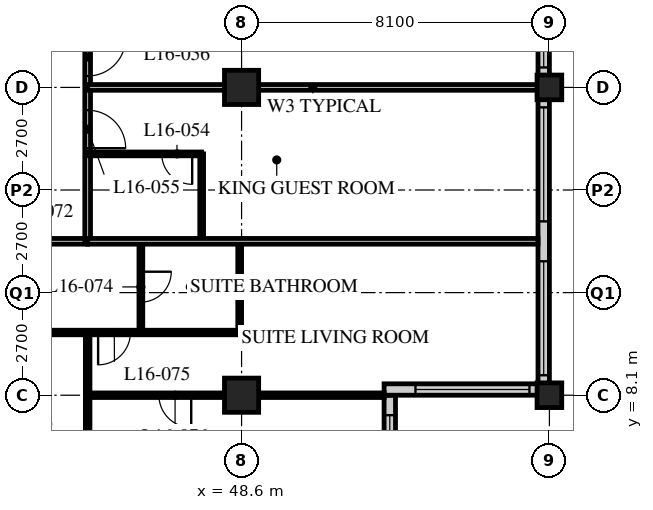
"""IFC4 building model, lengths in metres.
Left out: names, types, materials, properties, quantities, classifications, styles, units other than length and angle.
Written with IfcOpenShell. Run it as: python <this file> out.ifc"""

import sys

from ifc_helpers import new_model, si_unit, direction, frame, frame_2d, origin, origin_2d, place, context, subcontext, project, spatial, rectangle, hollow_rectangle, extrude, element, fill, save


model = new_model("IFC4")
c1 = context("Model", 3, precision=1e-05, world=origin(), true_north=direction((0.0, 1.0)))
c2 = subcontext(c1, "Body", "Model", "MODEL_VIEW")
j1 = project(units=[si_unit("LENGTHUNIT", "METRE"), si_unit("PLANEANGLEUNIT", "RADIAN")], contexts=[c1])
p1 = place(None, origin())
s1 = spatial("IfcSite", under=j1, at=p1, CompositionType="ELEMENT")
p2 = place(p1, origin())
s2 = spatial("IfcBuilding", under=s1, at=p2, CompositionType="ELEMENT")
p3 = place(p2, frame((0.0, 0.0, 67.0)))
s3 = spatial("IfcBuildingStorey", under=s2, at=p3, CompositionType="ELEMENT", Elevation=67.0)
for number, where, z_axis, x_axis in (
    (1, (48.6, 8.1, 0.0), (0.0, 0.0, 1.0), (1.0, 0.0, 0.0)),
    (2, (48.6, 16.2, 0.0), (0.0, 0.0, 1.0), (1.0, 0.0, 0.0)),
):
    element("IfcColumn", number, at=place(p3, frame(where, z_axis=z_axis, x_axis=x_axis)), inside=s3, PredefinedType="COLUMN", context=c2, shape_type="SweptSolid", body=[
        extrude(hollow_rectangle(XDim=0.9, YDim=0.9, WallThickness=0.09, at=origin_2d()), origin(), (0.0, 0.0, 1.0), 3.4),
    ])
for number, where, z_axis, x_axis in (
    (3, (56.7, 8.1, 0.0), (0.0, 0.0, 1.0), (1.0, 0.0, 0.0)),
    (4, (56.7, 16.2, 0.0), (0.0, 0.0, 1.0), (1.0, 0.0, 0.0)),
):
    element("IfcColumn", number, at=place(p3, frame(where, z_axis=z_axis, x_axis=x_axis)), inside=s3, PredefinedType="COLUMN", context=c2, shape_type="SweptSolid", body=[
        extrude(hollow_rectangle(XDim=0.65, YDim=0.65, WallThickness=0.05, at=origin_2d()), origin(), (0.0, 0.0, 1.0), 3.4),
    ])
p4 = place(p3, frame((52.5, 4.35, 0.0), z_axis=(0.0, 0.0, 1.0), x_axis=(0.0, 1.0, 0.0)))
e5 = element("IfcWall", 5, at=p4, inside=s3, PredefinedType="SOLIDWALL", context=c2, shape_type="SweptSolid", body=[
    extrude(rectangle(XDim=3.75, YDim=0.3, at=frame_2d((1.875, 0.0))), origin(), (0.0, 0.0, 1.0), 3.19),
])
p5 = place(p4, frame((0.225, 0.0, 0.9)))
e6 = element("IfcOpeningElement", 6, at=p5, cuts=e5, PredefinedType="OPENING", context=c2, shape_type="SweptSolid", body=[
    extrude(rectangle(XDim=3.0, YDim=1.5, at=frame_2d((1.5, 0.75))), frame((0.0, 0.16, 0.0), z_axis=(0.0, -1.0, 0.0), x_axis=(1.0, 0.0, 0.0)), (0.0, 0.0, 1.0), 0.32),
])
p6 = place(p3, frame((52.35, 8.25, 0.0), z_axis=(0.0, 0.0, 1.0), x_axis=(1.0, 0.0, 0.0)))
e7 = element("IfcWall", 7, at=p6, inside=s3, PredefinedType="SOLIDWALL", context=c2, shape_type="SweptSolid", body=[
    extrude(rectangle(XDim=4.35, YDim=0.3, at=frame_2d((2.175, 0.0))), origin(), (0.0, 0.0, 1.0), 3.19),
])
p7 = place(p6, frame((0.825, 0.0, 0.9)))
e8 = element("IfcOpeningElement", 8, at=p7, cuts=e7, PredefinedType="OPENING", context=c2, shape_type="SweptSolid", body=[
    extrude(rectangle(XDim=3.0, YDim=1.5, at=frame_2d((1.5, 0.75))), frame((0.0, 0.16, 0.0), z_axis=(0.0, -1.0, 0.0), x_axis=(1.0, 0.0, 0.0)), (0.0, 0.0, 1.0), 0.32),
])
p8 = place(p3, frame((56.55, 8.4, 0.0), z_axis=(0.0, 0.0, 1.0), x_axis=(0.0, 1.0, 0.0)))
e9 = element("IfcWall", 9, at=p8, inside=s3, PredefinedType="SOLIDWALL", context=c2, shape_type="SweptSolid", body=[
    extrude(rectangle(XDim=32.1, YDim=0.3, at=frame_2d((16.05, 0.0))), origin(), (0.0, 0.0, 1.0), 3.19),
])
p9 = place(p8, frame((0.225, 0.0, 0.9)))
e10 = element("IfcOpeningElement", 10, at=p9, cuts=e9, PredefinedType="OPENING", context=c2, shape_type="SweptSolid", body=[
    extrude(rectangle(XDim=3.0, YDim=2.0, at=frame_2d((1.5, 1.0))), frame((0.0, 0.16, 0.0), z_axis=(0.0, -1.0, 0.0), x_axis=(1.0, 0.0, 0.0)), (0.0, 0.0, 1.0), 0.32),
])
p10 = place(p8, frame((4.275, 0.0, 0.9)))
e11 = element("IfcOpeningElement", 11, at=p10, cuts=e9, PredefinedType="OPENING", context=c2, shape_type="SweptSolid", body=[
    extrude(rectangle(XDim=3.0, YDim=2.0, at=frame_2d((1.5, 1.0))), frame((0.0, 0.16, 0.0), z_axis=(0.0, -1.0, 0.0), x_axis=(1.0, 0.0, 0.0)), (0.0, 0.0, 1.0), 0.32),
])
p11 = place(p8, frame((8.325, 0.0, 0.9)))
e12 = element("IfcOpeningElement", 12, at=p11, cuts=e9, PredefinedType="OPENING", context=c2, shape_type="SweptSolid", body=[
    extrude(rectangle(XDim=3.0, YDim=2.0, at=frame_2d((1.5, 1.0))), frame((0.0, 0.16, 0.0), z_axis=(0.0, -1.0, 0.0), x_axis=(1.0, 0.0, 0.0)), (0.0, 0.0, 1.0), 0.32),
])
p12 = place(p8, frame((12.375, 0.0, 0.9)))
e13 = element("IfcOpeningElement", 13, at=p12, cuts=e9, PredefinedType="OPENING", context=c2, shape_type="SweptSolid", body=[
    extrude(rectangle(XDim=3.0, YDim=2.0, at=frame_2d((1.5, 1.0))), frame((0.0, 0.16, 0.0), z_axis=(0.0, -1.0, 0.0), x_axis=(1.0, 0.0, 0.0)), (0.0, 0.0, 1.0), 0.32),
])
p13 = place(p8, frame((16.425, 0.0, 0.9)))
e14 = element("IfcOpeningElement", 14, at=p13, cuts=e9, PredefinedType="OPENING", context=c2, shape_type="SweptSolid", body=[
    extrude(rectangle(XDim=3.0, YDim=2.0, at=frame_2d((1.5, 1.0))), frame((0.0, 0.16, 0.0), z_axis=(0.0, -1.0, 0.0), x_axis=(1.0, 0.0, 0.0)), (0.0, 0.0, 1.0), 0.32),
])
p14 = place(p8, frame((20.475, 0.0, 0.9)))
e15 = element("IfcOpeningElement", 15, at=p14, cuts=e9, PredefinedType="OPENING", context=c2, shape_type="SweptSolid", body=[
    extrude(rectangle(XDim=3.0, YDim=2.0, at=frame_2d((1.5, 1.0))), frame((0.0, 0.16, 0.0), z_axis=(0.0, -1.0, 0.0), x_axis=(1.0, 0.0, 0.0)), (0.0, 0.0, 1.0), 0.32),
])
p15 = place(p8, frame((24.525, 0.0, 0.9)))
e16 = element("IfcOpeningElement", 16, at=p15, cuts=e9, PredefinedType="OPENING", context=c2, shape_type="SweptSolid", body=[
    extrude(rectangle(XDim=3.0, YDim=2.0, at=frame_2d((1.5, 1.0))), frame((0.0, 0.16, 0.0), z_axis=(0.0, -1.0, 0.0), x_axis=(1.0, 0.0, 0.0)), (0.0, 0.0, 1.0), 0.32),
])
p16 = place(p8, frame((28.575, 0.0, 0.9)))
e17 = element("IfcOpeningElement", 17, at=p16, cuts=e9, PredefinedType="OPENING", context=c2, shape_type="SweptSolid", body=[
    extrude(rectangle(XDim=3.0, YDim=2.0, at=frame_2d((1.5, 1.0))), frame((0.0, 0.16, 0.0), z_axis=(0.0, -1.0, 0.0), x_axis=(1.0, 0.0, 0.0)), (0.0, 0.0, 1.0), 0.32),
])
p17 = place(p3, frame((8.1, 12.15, 0.0), z_axis=(0.0, 0.0, 1.0), x_axis=(1.0, 0.0, 0.0)))
e18 = element("IfcWall", 18, at=p17, inside=s3, PredefinedType="PARTITIONING", context=c2, shape_type="SweptSolid", body=[
    extrude(rectangle(XDim=36.45, YDim=0.15, at=frame_2d((18.225, 0.0))), origin(), (0.0, 0.0, 1.0), 3.19),
])
p18 = place(p17, frame((4.35, 0.0, 0.0)))
e19 = element("IfcOpeningElement", 19, at=p18, cuts=e18, PredefinedType="OPENING", context=c2, shape_type="SweptSolid", body=[
    extrude(rectangle(XDim=1.0, YDim=2.1, at=frame_2d((0.5, 1.05))), frame((0.0, 0.085, 0.0), z_axis=(0.0, -1.0, 0.0), x_axis=(1.0, 0.0, 0.0)), (0.0, 0.0, 1.0), 0.17),
])
p19 = place(p17, frame((10.55, 0.0, 0.0)))
e20 = element("IfcOpeningElement", 20, at=p19, cuts=e18, PredefinedType="OPENING", context=c2, shape_type="SweptSolid", body=[
    extrude(rectangle(XDim=1.0, YDim=2.1, at=frame_2d((0.5, 1.05))), frame((0.0, 0.085, 0.0), z_axis=(0.0, -1.0, 0.0), x_axis=(1.0, 0.0, 0.0)), (0.0, 0.0, 1.0), 0.17),
])
p20 = place(p17, frame((14.6, 0.0, 0.0)))
e21 = element("IfcOpeningElement", 21, at=p20, cuts=e18, PredefinedType="OPENING", context=c2, shape_type="SweptSolid", body=[
    extrude(rectangle(XDim=1.0, YDim=2.1, at=frame_2d((0.5, 1.05))), frame((0.0, 0.085, 0.0), z_axis=(0.0, -1.0, 0.0), x_axis=(1.0, 0.0, 0.0)), (0.0, 0.0, 1.0), 0.17),
])
p21 = place(p17, frame((18.65, 0.0, 0.0)))
e22 = element("IfcOpeningElement", 22, at=p21, cuts=e18, PredefinedType="OPENING", context=c2, shape_type="SweptSolid", body=[
    extrude(rectangle(XDim=1.0, YDim=2.1, at=frame_2d((0.5, 1.05))), frame((0.0, 0.085, 0.0), z_axis=(0.0, -1.0, 0.0), x_axis=(1.0, 0.0, 0.0)), (0.0, 0.0, 1.0), 0.17),
])
p22 = place(p17, frame((22.7, 0.0, 0.0)))
e23 = element("IfcOpeningElement", 23, at=p22, cuts=e18, PredefinedType="OPENING", context=c2, shape_type="SweptSolid", body=[
    extrude(rectangle(XDim=1.0, YDim=2.1, at=frame_2d((0.5, 1.05))), frame((0.0, 0.085, 0.0), z_axis=(0.0, -1.0, 0.0), x_axis=(1.0, 0.0, 0.0)), (0.0, 0.0, 1.0), 0.17),
])
p23 = place(p17, frame((24.6, 0.0, 0.0)))
e24 = element("IfcOpeningElement", 24, at=p23, cuts=e18, PredefinedType="OPENING", context=c2, shape_type="SweptSolid", body=[
    extrude(rectangle(XDim=1.0, YDim=2.1, at=frame_2d((0.5, 1.05))), frame((0.0, 0.085, 0.0), z_axis=(0.0, -1.0, 0.0), x_axis=(1.0, 0.0, 0.0)), (0.0, 0.0, 1.0), 0.17),
])
p24 = place(p17, frame((30.8, 0.0, 0.0)))
e25 = element("IfcOpeningElement", 25, at=p24, cuts=e18, PredefinedType="OPENING", context=c2, shape_type="SweptSolid", body=[
    extrude(rectangle(XDim=1.0, YDim=2.1, at=frame_2d((0.5, 1.05))), frame((0.0, 0.085, 0.0), z_axis=(0.0, -1.0, 0.0), x_axis=(1.0, 0.0, 0.0)), (0.0, 0.0, 1.0), 0.17),
])
p25 = place(p17, frame((1.525, 0.0, 0.0)))
e26 = element("IfcOpeningElement", 26, at=p25, cuts=e18, PredefinedType="OPENING", context=c2, shape_type="SweptSolid", body=[
    extrude(rectangle(XDim=1.0, YDim=2.1, at=frame_2d((0.5, 1.05))), frame((0.0, 0.085, 0.0), z_axis=(0.0, -1.0, 0.0), x_axis=(1.0, 0.0, 0.0)), (0.0, 0.0, 1.0), 0.17),
])
p26 = place(p17, frame((33.925, 0.0, 0.0)))
e27 = element("IfcOpeningElement", 27, at=p26, cuts=e18, PredefinedType="OPENING", context=c2, shape_type="SweptSolid", body=[
    extrude(rectangle(XDim=1.0, YDim=2.1, at=frame_2d((0.5, 1.05))), frame((0.0, 0.085, 0.0), z_axis=(0.0, -1.0, 0.0), x_axis=(1.0, 0.0, 0.0)), (0.0, 0.0, 1.0), 0.17),
])
p27 = place(p3, frame((44.55, 12.15, 0.0), z_axis=(0.0, 0.0, 1.0), x_axis=(0.0, 1.0, 0.0)))
e28 = element("IfcWall", 28, at=p27, inside=s3, PredefinedType="PARTITIONING", context=c2, shape_type="SweptSolid", body=[
    extrude(rectangle(XDim=30.15, YDim=0.15, at=frame_2d((15.075, 0.0))), origin(), (0.0, 0.0, 1.0), 3.19),
])
p28 = place(p27, frame((2.45, 0.0, 0.0)))
e29 = element("IfcOpeningElement", 29, at=p28, cuts=e28, PredefinedType="OPENING", context=c2, shape_type="SweptSolid", body=[
    extrude(rectangle(XDim=1.0, YDim=2.1, at=frame_2d((0.5, 1.05))), frame((0.0, 0.085, 0.0), z_axis=(0.0, -1.0, 0.0), x_axis=(1.0, 0.0, 0.0)), (0.0, 0.0, 1.0), 0.17),
])
p29 = place(p27, frame((4.35, 0.0, 0.0)))
e30 = element("IfcOpeningElement", 30, at=p29, cuts=e28, PredefinedType="OPENING", context=c2, shape_type="SweptSolid", body=[
    extrude(rectangle(XDim=1.0, YDim=2.1, at=frame_2d((0.5, 1.05))), frame((0.0, 0.085, 0.0), z_axis=(0.0, -1.0, 0.0), x_axis=(1.0, 0.0, 0.0)), (0.0, 0.0, 1.0), 0.17),
])
p30 = place(p27, frame((8.4, 0.0, 0.0)))
e31 = element("IfcOpeningElement", 31, at=p30, cuts=e28, PredefinedType="OPENING", context=c2, shape_type="SweptSolid", body=[
    extrude(rectangle(XDim=1.0, YDim=2.1, at=frame_2d((0.5, 1.05))), frame((0.0, 0.085, 0.0), z_axis=(0.0, -1.0, 0.0), x_axis=(1.0, 0.0, 0.0)), (0.0, 0.0, 1.0), 0.17),
])
p31 = place(p27, frame((14.6, 0.0, 0.0)))
e32 = element("IfcOpeningElement", 32, at=p31, cuts=e28, PredefinedType="OPENING", context=c2, shape_type="SweptSolid", body=[
    extrude(rectangle(XDim=1.0, YDim=2.1, at=frame_2d((0.5, 1.05))), frame((0.0, 0.085, 0.0), z_axis=(0.0, -1.0, 0.0), x_axis=(1.0, 0.0, 0.0)), (0.0, 0.0, 1.0), 0.17),
])
p32 = place(p27, frame((21.65, 0.0, 0.0)))
e33 = element("IfcOpeningElement", 33, at=p32, cuts=e28, PredefinedType="OPENING", context=c2, shape_type="SweptSolid", body=[
    extrude(rectangle(XDim=1.0, YDim=2.1, at=frame_2d((0.5, 1.05))), frame((0.0, 0.085, 0.0), z_axis=(0.0, -1.0, 0.0), x_axis=(1.0, 0.0, 0.0)), (0.0, 0.0, 1.0), 0.17),
])
p33 = place(p27, frame((26.7, 0.0, 0.0)))
e34 = element("IfcOpeningElement", 34, at=p33, cuts=e28, PredefinedType="OPENING", context=c2, shape_type="SweptSolid", body=[
    extrude(rectangle(XDim=1.0, YDim=2.1, at=frame_2d((0.5, 1.05))), frame((0.0, 0.085, 0.0), z_axis=(0.0, -1.0, 0.0), x_axis=(1.0, 0.0, 0.0)), (0.0, 0.0, 1.0), 0.17),
])
p34 = place(p3, frame((47.55, 12.15, 0.0), z_axis=(0.0, 0.0, 1.0), x_axis=(0.0, 1.0, 0.0)))
e35 = element("IfcWall", 35, at=p34, inside=s3, PredefinedType="PARTITIONING", context=c2, shape_type="SweptSolid", body=[
    extrude(rectangle(XDim=2.3, YDim=0.1, at=frame_2d((1.15, 0.0))), origin(), (0.0, 0.0, 1.0), 3.19),
])
p35 = place(p3, frame((44.55, 14.45, 0.0), z_axis=(0.0, 0.0, 1.0), x_axis=(1.0, 0.0, 0.0)))
e36 = element("IfcWall", 36, at=p35, inside=s3, PredefinedType="PARTITIONING", context=c2, shape_type="SweptSolid", body=[
    extrude(rectangle(XDim=3.0, YDim=0.1, at=frame_2d((1.5, 0.0))), origin(), (0.0, 0.0, 1.0), 3.19),
])
p36 = place(p35, frame((1.95, 0.0, 0.0)))
e37 = element("IfcOpeningElement", 37, at=p36, cuts=e36, PredefinedType="OPENING", context=c2, shape_type="SweptSolid", body=[
    extrude(rectangle(XDim=0.8, YDim=2.1, at=frame_2d((0.4, 1.05))), frame((0.0, 0.06, 0.0), z_axis=(0.0, -1.0, 0.0), x_axis=(1.0, 0.0, 0.0)), (0.0, 0.0, 1.0), 0.12),
])
p37 = place(p3, frame((44.55, 16.2, 0.0), z_axis=(0.0, 0.0, 1.0), x_axis=(1.0, 0.0, 0.0)))
e38 = element("IfcWall", 38, at=p37, inside=s3, PredefinedType="PARTITIONING", context=c2, shape_type="SweptSolid", body=[
    extrude(rectangle(XDim=11.85, YDim=0.15, at=frame_2d((5.925, 0.0))), origin(), (0.0, 0.0, 1.0), 2.578),
])
p38 = place(p3, frame((40.5, 9.75, 0.0), z_axis=(0.0, 0.0, 1.0), x_axis=(1.0, 0.0, 0.0)))
e39 = element("IfcWall", 39, at=p38, inside=s3, PredefinedType="PARTITIONING", context=c2, shape_type="SweptSolid", body=[
    extrude(rectangle(XDim=8.05, YDim=0.12, at=frame_2d((4.025, 0.0))), origin(), (0.0, 0.0, 1.0), 3.19),
])
p39 = place(p38, frame((0.475, 0.0, 0.0)))
e40 = element("IfcOpeningElement", 40, at=p39, cuts=e39, PredefinedType="OPENING", context=c2, shape_type="SweptSolid", body=[
    extrude(rectangle(XDim=0.85, YDim=2.1, at=frame_2d((0.425, 1.05))), frame((0.0, 0.07, 0.0), z_axis=(0.0, -1.0, 0.0), x_axis=(1.0, 0.0, 0.0)), (0.0, 0.0, 1.0), 0.14),
])
p40 = place(p38, frame((4.325, 0.0, 0.0)))
e41 = element("IfcOpeningElement", 41, at=p40, cuts=e39, PredefinedType="OPENING", context=c2, shape_type="SweptSolid", body=[
    extrude(rectangle(XDim=0.85, YDim=2.1, at=frame_2d((0.425, 1.05))), frame((0.0, 0.07, 0.0), z_axis=(0.0, -1.0, 0.0), x_axis=(1.0, 0.0, 0.0)), (0.0, 0.0, 1.0), 0.14),
])
p41 = place(p3, frame((45.95, 12.15, 0.0), z_axis=(0.0, 0.0, 1.0), x_axis=(0.0, -1.0, 0.0)))
e42 = element("IfcWall", 42, at=p41, inside=s3, PredefinedType="PARTITIONING", context=c2, shape_type="SweptSolid", body=[
    extrude(rectangle(XDim=2.4, YDim=0.1, at=frame_2d((1.2, 0.0))), origin(), (0.0, 0.0, 1.0), 3.19),
])
p42 = place(p41, frame((0.8, 0.0, 0.0)))
e43 = element("IfcOpeningElement", 43, at=p42, cuts=e42, PredefinedType="OPENING", context=c2, shape_type="SweptSolid", body=[
    extrude(rectangle(XDim=0.8, YDim=2.1, at=frame_2d((0.4, 1.05))), frame((0.0, 0.06, 0.0), z_axis=(0.0, -1.0, 0.0), x_axis=(1.0, 0.0, 0.0)), (0.0, 0.0, 1.0), 0.12),
])
p43 = place(p3, frame((48.55, 12.15, 0.0), z_axis=(0.0, 0.0, 1.0), x_axis=(0.0, -1.0, 0.0)))
e44 = element("IfcWall", 44, at=p43, inside=s3, PredefinedType="PARTITIONING", context=c2, shape_type="SweptSolid", body=[
    extrude(rectangle(XDim=2.4, YDim=0.1, at=frame_2d((1.2, 0.0))), origin(), (0.0, 0.0, 1.0), 2.578),
])
p44 = place(p3, frame((44.55, 9.75, 0.0), z_axis=(0.0, 0.0, 1.0), x_axis=(0.0, -1.0, 0.0)))
e45 = element("IfcWall", 45, at=p44, inside=s3, PredefinedType="PARTITIONING", context=c2, shape_type="SweptSolid", body=[
    extrude(rectangle(XDim=9.45, YDim=0.12, at=frame_2d((4.725, 0.0))), origin(), (0.0, 0.0, 1.0), 3.19),
])
p45 = place(p3, frame((44.55, 8.1, 0.0), z_axis=(0.0, 0.0, 1.0), x_axis=(1.0, 0.0, 0.0)))
e46 = element("IfcWall", 46, at=p45, inside=s3, PredefinedType="PARTITIONING", context=c2, shape_type="SweptSolid", body=[
    extrude(rectangle(XDim=7.8, YDim=0.12, at=frame_2d((3.9, 0.0))), origin(), (0.0, 0.0, 1.0), 2.578),
])
p46 = place(p45, frame((1.875, 0.0, 0.0)))
e47 = element("IfcOpeningElement", 47, at=p46, cuts=e46, PredefinedType="OPENING", context=c2, shape_type="SweptSolid", body=[
    extrude(rectangle(XDim=0.85, YDim=2.1, at=frame_2d((0.425, 1.05))), frame((0.0, 0.07, 0.0), z_axis=(0.0, -1.0, 0.0), x_axis=(1.0, 0.0, 0.0)), (0.0, 0.0, 1.0), 0.14),
])
p47 = place(p3, frame((44.55, 12.15, 0.0), z_axis=(0.0, 0.0, 1.0), x_axis=(1.0, 0.0, 0.0)))
e48 = element("IfcWall", 48, at=p47, inside=s3, PredefinedType="PARTITIONING", context=c2, shape_type="SweptSolid", body=[
    extrude(rectangle(XDim=11.85, YDim=0.15, at=frame_2d((5.925, 0.0))), origin(), (0.0, 0.0, 1.0), 3.19),
])
p48 = place(p5, origin())
e49 = element("IfcWindow", 49, at=p48, inside=s3, PartitioningType="SINGLE_PANEL", PredefinedType="WINDOW", context=c2, shape_type="SweptSolid", body=[
    extrude(rectangle(XDim=3.0, YDim=1.5, at=frame_2d((1.5, 0.75))), frame((0.0, 0.03, 0.0), z_axis=(0.0, -1.0, 0.0), x_axis=(1.0, 0.0, 0.0)), (0.0, 0.0, 1.0), 0.06),
])
fill(e6, e49)
p49 = place(p7, origin())
e50 = element("IfcWindow", 50, at=p49, inside=s3, PartitioningType="SINGLE_PANEL", PredefinedType="WINDOW", context=c2, shape_type="SweptSolid", body=[
    extrude(rectangle(XDim=3.0, YDim=1.5, at=frame_2d((1.5, 0.75))), frame((0.0, 0.03, 0.0), z_axis=(0.0, -1.0, 0.0), x_axis=(1.0, 0.0, 0.0)), (0.0, 0.0, 1.0), 0.06),
])
fill(e8, e50)
p50 = place(p9, origin())
e51 = element("IfcWindow", 51, at=p50, inside=s3, PartitioningType="SINGLE_PANEL", PredefinedType="WINDOW", context=c2, shape_type="SweptSolid", body=[
    extrude(rectangle(XDim=3.0, YDim=2.0, at=frame_2d((1.5, 1.0))), frame((0.0, 0.03, 0.0), z_axis=(0.0, -1.0, 0.0), x_axis=(1.0, 0.0, 0.0)), (0.0, 0.0, 1.0), 0.06),
])
fill(e10, e51)
p51 = place(p10, origin())
e52 = element("IfcWindow", 52, at=p51, inside=s3, PartitioningType="SINGLE_PANEL", PredefinedType="WINDOW", context=c2, shape_type="SweptSolid", body=[
    extrude(rectangle(XDim=3.0, YDim=2.0, at=frame_2d((1.5, 1.0))), frame((0.0, 0.03, 0.0), z_axis=(0.0, -1.0, 0.0), x_axis=(1.0, 0.0, 0.0)), (0.0, 0.0, 1.0), 0.06),
])
fill(e11, e52)
p52 = place(p11, origin())
e53 = element("IfcWindow", 53, at=p52, inside=s3, PartitioningType="SINGLE_PANEL", PredefinedType="WINDOW", context=c2, shape_type="SweptSolid", body=[
    extrude(rectangle(XDim=3.0, YDim=2.0, at=frame_2d((1.5, 1.0))), frame((0.0, 0.03, 0.0), z_axis=(0.0, -1.0, 0.0), x_axis=(1.0, 0.0, 0.0)), (0.0, 0.0, 1.0), 0.06),
])
fill(e12, e53)
p53 = place(p36, origin())
e54 = element("IfcDoor", 54, at=p53, inside=s3, OperationType="SINGLE_SWING_LEFT", PredefinedType="DOOR", context=c2, shape_type="SweptSolid", body=[
    extrude(rectangle(XDim=0.8, YDim=2.1, at=frame_2d((0.4, 1.05))), frame((0.0, 0.025, 0.0), z_axis=(0.0, -1.0, 0.0), x_axis=(1.0, 0.0, 0.0)), (0.0, 0.0, 1.0), 0.05),
])
fill(e37, e54)
p54 = place(p28, origin())
e55 = element("IfcDoor", 55, at=p54, inside=s3, OperationType="SINGLE_SWING_RIGHT", PredefinedType="DOOR", context=c2, shape_type="SweptSolid", body=[
    extrude(rectangle(XDim=1.0, YDim=2.1, at=frame_2d((0.5, 1.05))), frame((0.0, 0.025, 0.0), z_axis=(0.0, -1.0, 0.0), x_axis=(1.0, 0.0, 0.0)), (0.0, 0.0, 1.0), 0.05),
])
fill(e29, e55)
p55 = place(p29, origin())
e56 = element("IfcDoor", 56, at=p55, inside=s3, OperationType="SINGLE_SWING_LEFT", PredefinedType="DOOR", context=c2, shape_type="SweptSolid", body=[
    extrude(rectangle(XDim=1.0, YDim=2.1, at=frame_2d((0.5, 1.05))), frame((0.0, 0.025, 0.0), z_axis=(0.0, -1.0, 0.0), x_axis=(1.0, 0.0, 0.0)), (0.0, 0.0, 1.0), 0.05),
])
fill(e30, e56)
p56 = place(p42, origin())
e57 = element("IfcDoor", 57, at=p56, inside=s3, OperationType="SINGLE_SWING_LEFT", PredefinedType="DOOR", context=c2, shape_type="SweptSolid", body=[
    extrude(rectangle(XDim=0.8, YDim=2.1, at=frame_2d((0.4, 1.05))), frame((0.0, 0.025, 0.0), z_axis=(0.0, -1.0, 0.0), x_axis=(1.0, 0.0, 0.0)), (0.0, 0.0, 1.0), 0.05),
])
fill(e43, e57)
p57 = place(p40, origin())
e58 = element("IfcDoor", 58, at=p57, inside=s3, OperationType="SINGLE_SWING_RIGHT", PredefinedType="DOOR", context=c2, shape_type="SweptSolid", body=[
    extrude(rectangle(XDim=0.85, YDim=2.1, at=frame_2d((0.425, 1.05))), frame((0.0, 0.025, 0.0), z_axis=(0.0, -1.0, 0.0), x_axis=(1.0, 0.0, 0.0)), (0.0, 0.0, 1.0), 0.05),
])
fill(e41, e58)
p58 = place(p46, origin())
e59 = element("IfcDoor", 59, at=p58, inside=s3, OperationType="SINGLE_SWING_LEFT", PredefinedType="DOOR", context=c2, shape_type="SweptSolid", body=[
    extrude(rectangle(XDim=0.85, YDim=2.1, at=frame_2d((0.425, 1.05))), frame((0.0, 0.025, 0.0), z_axis=(0.0, -1.0, 0.0), x_axis=(1.0, 0.0, 0.0)), (0.0, 0.0, 1.0), 0.05),
])
fill(e47, e59)
save(model, sys.argv[1])
